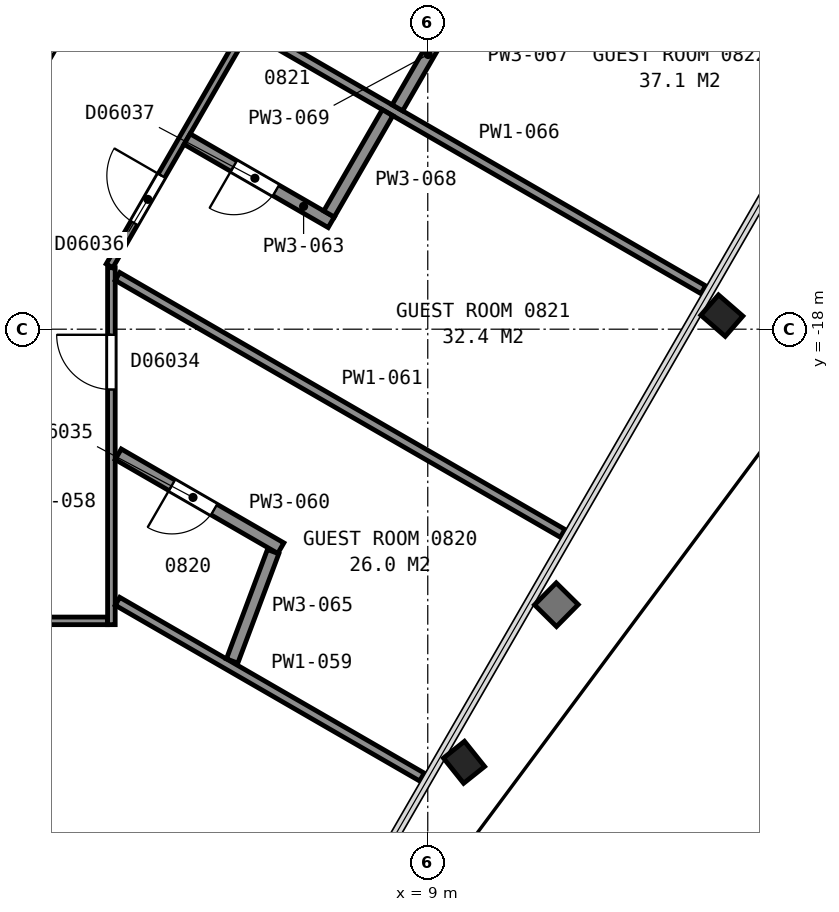
"""IFC4 building model, lengths in metres.
Left out: names, types, materials, properties, quantities, classifications, styles, units other than length and angle.
Written with IfcOpenShell. Run it as: python <this file> out.ifc"""

import sys

from ifc_helpers import new_model, si_unit, direction, frame, frame_2d, origin, origin_2d, place, context, subcontext, project, spatial, rectangle, i_section, extrude, element, fill, save


model = new_model("IFC4")
c1 = context("Model", 3, precision=1e-05, world=origin(), true_north=direction((0.0, 1.0)))
c2 = subcontext(c1, "Body", "Model", "MODEL_VIEW")
j1 = project(units=[si_unit("LENGTHUNIT", "METRE"), si_unit("PLANEANGLEUNIT", "RADIAN")], contexts=[c1])
p1 = place(None, origin())
s1 = spatial("IfcSite", under=j1, at=p1, CompositionType="ELEMENT")
p2 = place(p1, origin())
s2 = spatial("IfcBuilding", under=s1, at=p2, CompositionType="ELEMENT")
p3 = place(p2, frame((0.0, 0.0, 44.0)))
s3 = spatial("IfcBuildingStorey", under=s2, at=p3, CompositionType="ELEMENT", Elevation=44.0)
p4 = place(p3, frame((9.531, -25.042, 0.025), z_axis=(0.055280193141, -0.0691858675, 0.99607098943), x_axis=(-0.500260579817, -0.865270863032, -0.032337066484)))
e1 = element("IfcColumn", 1, at=p4, inside=s3, PredefinedType="COLUMN", context=c2, shape_type="SweptSolid", body=[
    extrude(i_section(OverallWidth=0.442, OverallDepth=0.531, WebThickness=0.066, FlangeThickness=0.106, FilletRadius=0.015, at=origin_2d()), origin(), (0.0, 0.0, 1.0), 3.564),
])
p5 = place(p3, frame((13.762, -17.711, 0.025), z_axis=(0.063592270579, -0.055369132142, 0.996438800092), x_axis=(-0.500488244377, -0.865592544789, -0.016157464095)))
e2 = element("IfcColumn", 2, at=p5, inside=s3, PredefinedType="COLUMN", context=c2, shape_type="SweptSolid", body=[
    extrude(i_section(OverallWidth=0.442, OverallDepth=0.531, WebThickness=0.066, FlangeThickness=0.106, FilletRadius=0.015, at=origin_2d()), origin(), (0.0, 0.0, 1.0), 3.563),
])
p6 = place(p3, frame((1.677, -14.815, 0.0), z_axis=(0.0, 0.0, 1.0), x_axis=(0.49999445743, 0.866028603765, 0.0)))
e3 = element("IfcWall", 3, at=p6, inside=s3, PredefinedType="PARTITIONING", context=c2, shape_type="SweptSolid", body=[
    extrude(rectangle(XDim=5.905, YDim=0.2, at=frame_2d((2.952, 0.0))), origin(), (0.0, 0.0, 1.0), 3.35),
])
p7 = place(p6, frame((3.855, 0.0, 0.0)))
e4 = element("IfcOpeningElement", 4, at=p7, cuts=e3, PredefinedType="OPENING", context=c2, shape_type="SweptSolid", body=[
    extrude(rectangle(XDim=1.8, YDim=2.1, at=frame_2d((0.9, 1.05))), frame((0.0, 0.11, 0.0), z_axis=(0.0, -1.0, 0.0), x_axis=(1.0, 0.0, 0.0)), (0.0, 0.0, 1.0), 0.22),
])
p8 = place(p3, frame((0.333, -22.797, 0.0), z_axis=(0.0, 0.0, 1.0), x_axis=(1.0, 0.0, 0.0)))
e5 = element("IfcWall", 5, at=p8, inside=s3, PredefinedType="PARTITIONING", context=c2, shape_type="SweptSolid", body=[
    extrude(rectangle(XDim=3.399, YDim=0.125, at=frame_2d((1.7, 0.0))), origin(), (0.0, 0.0, 1.0), 2.613),
])
p9 = place(p3, frame((3.797, -16.989, 0.0), z_axis=(0.0, 0.0, 1.0), x_axis=(0.0, -1.0, 0.0)))
e6 = element("IfcWall", 6, at=p9, inside=s3, PredefinedType="PARTITIONING", context=c2, shape_type="SweptSolid", body=[
    extrude(rectangle(XDim=5.871, YDim=0.125, at=frame_2d((2.935, 0.0))), origin(), (0.0, 0.0, 1.0), 2.613),
])
p10 = place(p9, frame((1.103, 0.0, 0.0)))
e7 = element("IfcOpeningElement", 7, at=p10, cuts=e6, PredefinedType="OPENING", context=c2, shape_type="SweptSolid", body=[
    extrude(rectangle(XDim=0.9, YDim=2.1, at=frame_2d((0.45, 1.05))), frame((0.0, 0.073, 0.0), z_axis=(0.0, -1.0, 0.0), x_axis=(1.0, 0.0, 0.0)), (0.0, 0.0, 1.0), 0.145),
])
p11 = place(p3, frame((3.897, -22.475, 0.0), z_axis=(0.0, 0.0, 1.0), x_axis=(0.866025977343, -0.499999006567, 0.0)))
e8 = element("IfcWall", 8, at=p11, inside=s3, PredefinedType="PARTITIONING", context=c2, shape_type="SweptSolid", body=[
    extrude(rectangle(XDim=5.782, YDim=0.15, at=frame_2d((2.891, 0.0))), origin(), (0.0, 0.0, 1.0), 2.613),
])
p12 = place(p3, frame((6.583, -21.601, 0.0), z_axis=(0.0, 0.0, 1.0), x_axis=(-0.865981493415, 0.500076047279, 0.0)))
e9 = element("IfcWall", 9, at=p12, inside=s3, PredefinedType="PARTITIONING", context=c2, shape_type="SweptSolid", body=[
    extrude(rectangle(XDim=3.088, YDim=0.2, at=frame_2d((1.544, 0.0))), origin(), (0.0, 0.0, 1.0), 2.613),
])
p13 = place(p12, frame((1.268, 0.0, 0.0)))
e10 = element("IfcOpeningElement", 10, at=p13, cuts=e9, PredefinedType="OPENING", context=c2, shape_type="SweptSolid", body=[
    extrude(rectangle(XDim=0.8, YDim=2.1, at=frame_2d((0.4, 1.05))), frame((0.0, 0.11, 0.0), z_axis=(0.0, -1.0, 0.0), x_axis=(1.0, 0.0, 0.0)), (0.0, 0.0, 1.0), 0.22),
])
p14 = place(p3, frame((3.897, -17.132, 0.0), z_axis=(0.0, 0.0, 1.0), x_axis=(0.866084603656, -0.499897448793, 0.0)))
e11 = element("IfcWall", 11, at=p14, inside=s3, PredefinedType="PARTITIONING", context=c2, shape_type="SweptSolid", body=[
    extrude(rectangle(XDim=8.454, YDim=0.15, at=frame_2d((4.227, 0.0))), origin(), (0.0, 0.0, 1.0), 2.613),
])
p15 = place(p3, frame((16.967, 5.906, 0.0), z_axis=(0.0, 0.0, 1.0), x_axis=(-0.500024758804, -0.866011108811, 0.0)))
e12 = element("IfcWall", 12, at=p15, inside=s3, PredefinedType="PARTITIONING", context=c2, shape_type="SweptSolid", body=[
    extrude(rectangle(XDim=26.402, YDim=0.125, at=frame_2d((13.201, 0.0))), origin(), (0.0, 0.0, 1.0), 2.613),
])
p16 = place(p15, frame((24.689, 0.0, 0.0)))
e13 = element("IfcOpeningElement", 13, at=p16, cuts=e12, PredefinedType="OPENING", context=c2, shape_type="SweptSolid", body=[
    extrude(rectangle(XDim=0.9, YDim=2.1, at=frame_2d((0.45, 1.05))), frame((0.0, 0.073, 0.0), z_axis=(0.0, -1.0, 0.0), x_axis=(1.0, 0.0, 0.0)), (0.0, 0.0, 1.0), 0.145),
])
p17 = place(p15, frame((17.709, 0.0, 0.0)))
e14 = element("IfcOpeningElement", 14, at=p17, cuts=e12, PredefinedType="OPENING", context=c2, shape_type="SweptSolid", body=[
    extrude(rectangle(XDim=0.9, YDim=2.1, at=frame_2d((0.45, 1.05))), frame((0.0, 0.073, 0.0), z_axis=(0.0, -1.0, 0.0), x_axis=(1.0, 0.0, 0.0)), (0.0, 0.0, 1.0), 0.145),
])
p18 = place(p15, frame((14.928, 0.0, 0.0)))
e15 = element("IfcOpeningElement", 15, at=p18, cuts=e12, PredefinedType="OPENING", context=c2, shape_type="SweptSolid", body=[
    extrude(rectangle(XDim=0.9, YDim=2.1, at=frame_2d((0.45, 1.05))), frame((0.0, 0.073, 0.0), z_axis=(0.0, -1.0, 0.0), x_axis=(1.0, 0.0, 0.0)), (0.0, 0.0, 1.0), 0.145),
])
p19 = place(p15, frame((8.2, 0.0, 0.0)))
e16 = element("IfcOpeningElement", 16, at=p19, cuts=e12, PredefinedType="OPENING", context=c2, shape_type="SweptSolid", body=[
    extrude(rectangle(XDim=0.9, YDim=2.1, at=frame_2d((0.45, 1.05))), frame((0.0, 0.073, 0.0), z_axis=(0.0, -1.0, 0.0), x_axis=(1.0, 0.0, 0.0)), (0.0, 0.0, 1.0), 0.145),
])
p20 = place(p15, frame((5.473, 0.0, 0.0)))
e17 = element("IfcOpeningElement", 17, at=p20, cuts=e12, PredefinedType="OPENING", context=c2, shape_type="SweptSolid", body=[
    extrude(rectangle(XDim=1.0, YDim=2.1, at=frame_2d((0.5, 1.05))), frame((0.0, 0.073, 0.0), z_axis=(0.0, -1.0, 0.0), x_axis=(1.0, 0.0, 0.0)), (0.0, 0.0, 1.0), 0.145),
])
p21 = place(p3, frame((5.042, -14.873, 0.0), z_axis=(0.0, 0.0, 1.0), x_axis=(0.866005850709, -0.50003386539, 0.0)))
e18 = element("IfcWall", 18, at=p21, inside=s3, PredefinedType="PARTITIONING", context=c2, shape_type="SweptSolid", body=[
    extrude(rectangle(XDim=2.737, YDim=0.2, at=frame_2d((1.369, 0.0))), origin(), (0.0, 0.0, 1.0), 2.613),
])
p22 = place(p21, frame((0.887, 0.0, 0.0)))
e19 = element("IfcOpeningElement", 19, at=p22, cuts=e18, PredefinedType="OPENING", context=c2, shape_type="SweptSolid", body=[
    extrude(rectangle(XDim=0.8, YDim=2.1, at=frame_2d((0.4, 1.05))), frame((0.0, 0.11, 0.0), z_axis=(0.0, -1.0, 0.0), x_axis=(1.0, 0.0, 0.0)), (0.0, 0.0, 1.0), 0.22),
])
p23 = place(p3, frame((5.782, -23.457, 0.0), z_axis=(0.0, 0.0, 1.0), x_axis=(0.350942351116, 0.936397066523, 0.0)))
e20 = element("IfcWall", 20, at=p23, inside=s3, PredefinedType="PARTITIONING", context=c2, shape_type="SweptSolid", body=[
    extrude(rectangle(XDim=1.921, YDim=0.2, at=frame_2d((0.96, 0.0))), origin(), (0.0, 0.0, 1.0), 2.613),
])
p24 = place(p3, frame((6.092, -13.055, 0.0), z_axis=(0.0, 0.0, 1.0), x_axis=(0.866002910178, -0.500038958046, 0.0)))
e21 = element("IfcWall", 21, at=p24, inside=s3, PredefinedType="PARTITIONING", context=c2, shape_type="SweptSolid", body=[
    extrude(rectangle(XDim=8.591, YDim=0.15, at=frame_2d((4.295, 0.0))), origin(), (0.0, 0.0, 1.0), 2.613),
])
p25 = place(p3, frame((7.376, -16.105, 0.0), z_axis=(0.0, 0.0, 1.0), x_axis=(0.500095816526, 0.865970077019, 0.0)))
e22 = element("IfcWall", 22, at=p25, inside=s3, PredefinedType="PARTITIONING", context=c2, shape_type="SweptSolid", body=[
    extrude(rectangle(XDim=1.924, YDim=0.2, at=frame_2d((0.962, 0.0))), origin(), (0.0, 0.0, 1.0), 2.613),
])
p26 = place(p3, frame((8.5, -14.359, 0.0), z_axis=(0.0, 0.0, 1.0), x_axis=(0.500042536776, 0.866000843773, 0.0)))
e23 = element("IfcWall", 23, at=p26, inside=s3, PredefinedType="PARTITIONING", context=c2, shape_type="SweptSolid", body=[
    extrude(rectangle(XDim=2.025, YDim=0.2, at=frame_2d((1.012, 0.0))), origin(), (0.0, 0.0, 1.0), 2.613),
])
p27 = place(p10, origin())
e24 = element("IfcDoor", 24, at=p27, inside=s3, OperationType="SINGLE_SWING_LEFT", PredefinedType="DOOR", context=c2, shape_type="SweptSolid", body=[
    extrude(rectangle(XDim=0.9, YDim=2.1, at=frame_2d((0.45, 1.05))), frame((0.0, 0.025, 0.0), z_axis=(0.0, -1.0, 0.0), x_axis=(1.0, 0.0, 0.0)), (0.0, 0.0, 1.0), 0.05),
])
fill(e7, e24)
p28 = place(p13, origin())
e25 = element("IfcDoor", 25, at=p28, inside=s3, OperationType="SINGLE_SWING_RIGHT", PredefinedType="DOOR", context=c2, shape_type="SweptSolid", body=[
    extrude(rectangle(XDim=0.8, YDim=2.1, at=frame_2d((0.4, 1.05))), frame((0.0, 0.025, 0.0), z_axis=(0.0, -1.0, 0.0), x_axis=(1.0, 0.0, 0.0)), (0.0, 0.0, 1.0), 0.05),
])
fill(e10, e25)
p29 = place(p16, origin())
e26 = element("IfcDoor", 26, at=p29, inside=s3, OperationType="SINGLE_SWING_LEFT", PredefinedType="DOOR", context=c2, shape_type="SweptSolid", body=[
    extrude(rectangle(XDim=0.9, YDim=2.1, at=frame_2d((0.45, 1.05))), frame((0.0, 0.025, 0.0), z_axis=(0.0, -1.0, 0.0), x_axis=(1.0, 0.0, 0.0)), (0.0, 0.0, 1.0), 0.05),
])
fill(e13, e26)
p30 = place(p22, origin())
e27 = element("IfcDoor", 27, at=p30, inside=s3, OperationType="SINGLE_SWING_LEFT", PredefinedType="DOOR", context=c2, shape_type="SweptSolid", body=[
    extrude(rectangle(XDim=0.8, YDim=2.1, at=frame_2d((0.4, 1.05))), frame((0.0, 0.025, 0.0), z_axis=(0.0, -1.0, 0.0), x_axis=(1.0, 0.0, 0.0)), (0.0, 0.0, 1.0), 0.05),
])
fill(e19, e27)
save(model, sys.argv[1])
